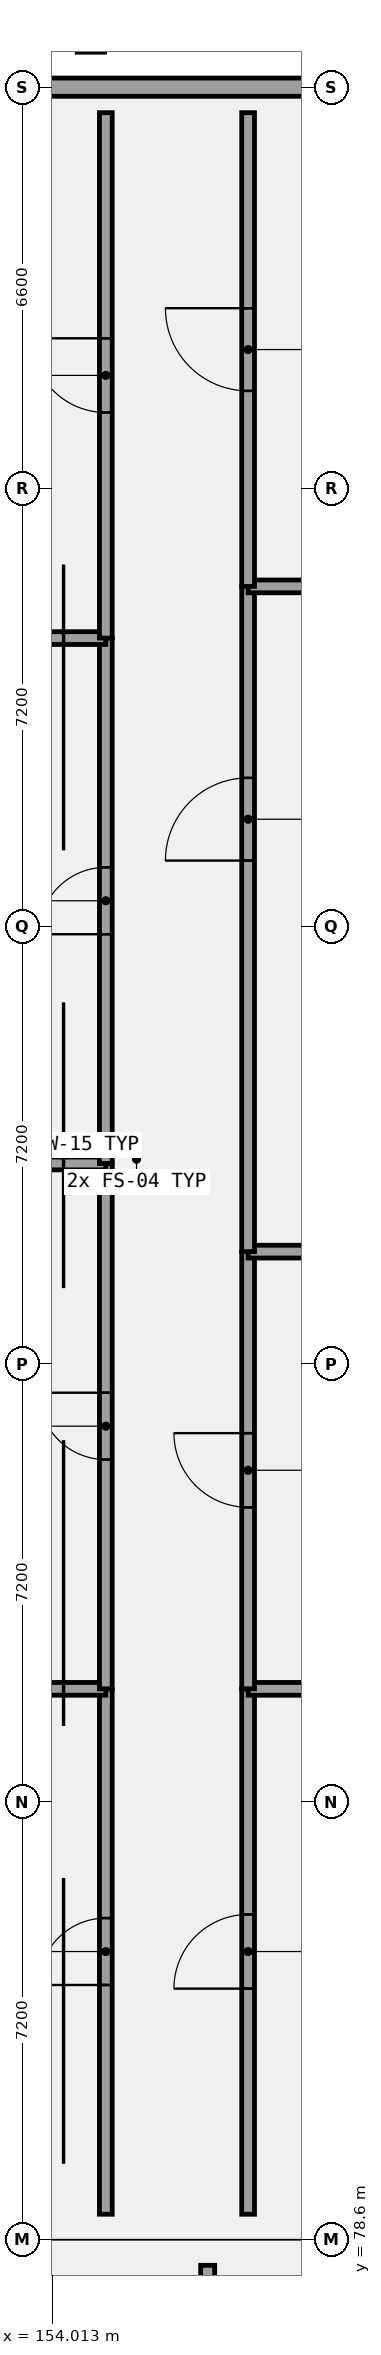
"""IFC4 building model, lengths in metres.
Left out: names, types, materials, properties, quantities, classifications, styles, units other than length and angle.
Written with IfcOpenShell. Run it as: python <this file> out.ifc"""

import sys

from ifc_helpers import new_model, si_unit, direction, frame, frame_2d, origin, origin_2d, place, context, subcontext, project, spatial, rectangle, extrude, element, fill, save


model = new_model("IFC4")
c1 = context("Model", 3, precision=1e-05, world=origin(), true_north=direction((0.0, 1.0)))
c2 = subcontext(c1, "Body", "Model", "MODEL_VIEW")
j1 = project(units=[si_unit("LENGTHUNIT", "METRE"), si_unit("PLANEANGLEUNIT", "RADIAN")], contexts=[c1])
p1 = place(None, origin())
s1 = spatial("IfcSite", under=j1, at=p1, CompositionType="ELEMENT")
p2 = place(p1, origin())
s2 = spatial("IfcBuilding", under=s1, at=p2, CompositionType="ELEMENT")
p3 = place(p2, frame((0.0, 0.0, 5.4)))
s3 = spatial("IfcBuildingStorey", under=s2, at=p3, CompositionType="ELEMENT", Elevation=5.4)
p4 = place(p3, frame((154.65, 114.95, 0.0), z_axis=(0.0, 0.0, 1.0), x_axis=(1.0, 0.0, 0.0)))
e1 = element("IfcColumn", 1, at=p4, inside=s3, PredefinedType="PILASTER", context=c2, shape_type="SweptSolid", body=[
    extrude(rectangle(XDim=0.45, YDim=0.75, at=origin_2d()), origin(), (0.0, 0.0, 1.0), 4.2),
])
p5 = place(p3, frame((166.35, 114.0, 0.0), z_axis=(0.0, 0.0, 1.0), x_axis=(-1.0, 0.0, 0.0)))
e2 = element("IfcWall", 2, at=p5, inside=s3, PredefinedType="SOLIDWALL", context=c2, shape_type="SweptSolid", body=[
    extrude(rectangle(XDim=21.9, YDim=0.3, at=frame_2d((10.95, 0.0))), origin(), (0.0, 0.0, 1.0), 3.17),
])
p6 = place(p5, frame((17.65, 0.0, 0.95)))
e3 = element("IfcOpeningElement", 3, at=p6, cuts=e2, PredefinedType="OPENING", context=c2, shape_type="SweptSolid", body=[
    extrude(rectangle(XDim=1.0, YDim=1.9, at=frame_2d((0.5, 0.95))), frame((0.0, 0.16, 0.0), z_axis=(0.0, -1.0, 0.0), x_axis=(1.0, 0.0, 0.0)), (0.0, 0.0, 1.0), 0.32),
])
p7 = place(p3, frame((154.895, 79.02, 0.0), z_axis=(0.0, 0.0, 1.0), x_axis=(0.0, 1.0, 0.0)))
e4 = element("IfcWall", 4, at=p7, inside=s3, PredefinedType="PARTITIONING", context=c2, shape_type="SweptSolid", body=[
    extrude(rectangle(XDim=8.64, YDim=0.21, at=frame_2d((4.32, 0.0))), origin(), (0.0, 0.0, 1.0), 3.92),
])
p8 = place(p7, frame((3.77, 0.0, 0.0)))
e5 = element("IfcOpeningElement", 5, at=p8, cuts=e4, PredefinedType="OPENING", context=c2, shape_type="SweptSolid", body=[
    extrude(rectangle(XDim=1.1, YDim=2.1, at=frame_2d((0.55, 1.05))), frame((0.0, 0.115, 0.0), z_axis=(0.0, -1.0, 0.0), x_axis=(1.0, 0.0, 0.0)), (0.0, 0.0, 1.0), 0.23),
])
p9 = place(p3, frame((145.25, 87.66, 0.0), z_axis=(0.0, 0.0, 1.0), x_axis=(1.0, 0.0, 0.0)))
e6 = element("IfcWall", 6, at=p9, inside=s3, PredefinedType="PARTITIONING", context=c2, shape_type="SweptSolid", body=[
    extrude(rectangle(XDim=9.645, YDim=0.21, at=frame_2d((4.823, 0.0))), origin(), (0.0, 0.0, 1.0), 3.37),
])
p10 = place(p3, frame((154.895, 87.66, 0.0), z_axis=(0.0, 0.0, 1.0), x_axis=(0.0, 1.0, 0.0)))
e7 = element("IfcWall", 7, at=p10, inside=s3, PredefinedType="PARTITIONING", context=c2, shape_type="SweptSolid", body=[
    extrude(rectangle(XDim=8.64, YDim=0.21, at=frame_2d((4.32, 0.0))), origin(), (0.0, 0.0, 1.0), 3.92),
])
p11 = place(p10, frame((3.77, 0.0, 0.0)))
e8 = element("IfcOpeningElement", 8, at=p11, cuts=e7, PredefinedType="OPENING", context=c2, shape_type="SweptSolid", body=[
    extrude(rectangle(XDim=1.1, YDim=2.22, at=frame_2d((0.55, 1.11))), frame((0.0, 0.115, 0.0), z_axis=(0.0, -1.0, 0.0), x_axis=(1.0, 0.0, 0.0)), (0.0, 0.0, 1.0), 0.23),
])
p12 = place(p3, frame((145.25, 96.3, 0.0), z_axis=(0.0, 0.0, 1.0), x_axis=(1.0, 0.0, 0.0)))
e9 = element("IfcWall", 9, at=p12, inside=s3, PredefinedType="PARTITIONING", context=c2, shape_type="SweptSolid", body=[
    extrude(rectangle(XDim=9.645, YDim=0.21, at=frame_2d((4.823, 0.0))), origin(), (0.0, 0.0, 1.0), 3.92),
])
p13 = place(p3, frame((154.895, 96.3, 0.0), z_axis=(0.0, 0.0, 1.0), x_axis=(0.0, 1.0, 0.0)))
e10 = element("IfcWall", 10, at=p13, inside=s3, PredefinedType="PARTITIONING", context=c2, shape_type="SweptSolid", body=[
    extrude(rectangle(XDim=8.64, YDim=0.21, at=frame_2d((4.32, 0.0))), origin(), (0.0, 0.0, 1.0), 3.92),
])
p14 = place(p13, frame((3.77, 0.0, 0.0)))
e11 = element("IfcOpeningElement", 11, at=p14, cuts=e10, PredefinedType="OPENING", context=c2, shape_type="SweptSolid", body=[
    extrude(rectangle(XDim=1.1, YDim=2.35, at=frame_2d((0.55, 1.175))), frame((0.0, 0.115, 0.0), z_axis=(0.0, -1.0, 0.0), x_axis=(1.0, 0.0, 0.0)), (0.0, 0.0, 1.0), 0.23),
])
p15 = place(p3, frame((145.25, 104.94, 0.0), z_axis=(0.0, 0.0, 1.0), x_axis=(1.0, 0.0, 0.0)))
e12 = element("IfcWall", 12, at=p15, inside=s3, PredefinedType="PARTITIONING", context=c2, shape_type="SweptSolid", body=[
    extrude(rectangle(XDim=9.645, YDim=0.21, at=frame_2d((4.823, 0.0))), origin(), (0.0, 0.0, 1.0), 3.92),
])
p16 = place(p3, frame((154.895, 104.94, 0.0), z_axis=(0.0, 0.0, 1.0), x_axis=(0.0, 1.0, 0.0)))
e13 = element("IfcWall", 13, at=p16, inside=s3, PredefinedType="PARTITIONING", context=c2, shape_type="SweptSolid", body=[
    extrude(rectangle(XDim=8.64, YDim=0.21, at=frame_2d((4.32, 0.0))), origin(), (0.0, 0.0, 1.0), 3.92),
])
p17 = place(p16, frame((3.71, 0.0, 0.0)))
e14 = element("IfcOpeningElement", 14, at=p17, cuts=e13, PredefinedType="OPENING", context=c2, shape_type="SweptSolid", body=[
    extrude(rectangle(XDim=1.22, YDim=2.1, at=frame_2d((0.61, 1.05))), frame((0.0, 0.115, 0.0), z_axis=(0.0, -1.0, 0.0), x_axis=(1.0, 0.0, 0.0)), (0.0, 0.0, 1.0), 0.23),
])
p18 = place(p3, frame((157.235, 79.02, 0.0), z_axis=(0.0, 0.0, 1.0), x_axis=(0.0, 1.0, 0.0)))
e15 = element("IfcWall", 15, at=p18, inside=s3, PredefinedType="PARTITIONING", context=c2, shape_type="SweptSolid", body=[
    extrude(rectangle(XDim=8.64, YDim=0.21, at=frame_2d((4.32, 0.0))), origin(), (0.0, 0.0, 1.0), 3.92),
])
p19 = place(p18, frame((3.71, 0.0, 0.0)))
e16 = element("IfcOpeningElement", 16, at=p19, cuts=e15, PredefinedType="OPENING", context=c2, shape_type="SweptSolid", body=[
    extrude(rectangle(XDim=1.22, YDim=2.22, at=frame_2d((0.61, 1.11))), frame((0.0, 0.115, 0.0), z_axis=(0.0, -1.0, 0.0), x_axis=(1.0, 0.0, 0.0)), (0.0, 0.0, 1.0), 0.23),
])
p20 = place(p3, frame((157.235, 87.66, 0.0), z_axis=(0.0, 0.0, 1.0), x_axis=(1.0, 0.0, 0.0)))
e17 = element("IfcWall", 17, at=p20, inside=s3, PredefinedType="PARTITIONING", context=c2, shape_type="SweptSolid", body=[
    extrude(rectangle(XDim=8.785, YDim=0.21, at=frame_2d((4.393, 0.0))), origin(), (0.0, 0.0, 1.0), 3.37),
])
p21 = place(p3, frame((157.235, 87.66, 0.0), z_axis=(0.0, 0.0, 1.0), x_axis=(0.0, 1.0, 0.0)))
e18 = element("IfcWall", 18, at=p21, inside=s3, PredefinedType="PARTITIONING", context=c2, shape_type="SweptSolid", body=[
    extrude(rectangle(XDim=7.19, YDim=0.21, at=frame_2d((3.595, 0.0))), origin(), (0.0, 0.0, 1.0), 3.92),
])
p22 = place(p21, frame((2.985, 0.0, 0.0)))
e19 = element("IfcOpeningElement", 19, at=p22, cuts=e18, PredefinedType="OPENING", context=c2, shape_type="SweptSolid", body=[
    extrude(rectangle(XDim=1.22, YDim=2.35, at=frame_2d((0.61, 1.175))), frame((0.0, 0.115, 0.0), z_axis=(0.0, -1.0, 0.0), x_axis=(1.0, 0.0, 0.0)), (0.0, 0.0, 1.0), 0.23),
])
p23 = place(p3, frame((157.235, 94.85, 0.0), z_axis=(0.0, 0.0, 1.0), x_axis=(1.0, 0.0, 0.0)))
e20 = element("IfcWall", 20, at=p23, inside=s3, PredefinedType="PARTITIONING", context=c2, shape_type="SweptSolid", body=[
    extrude(rectangle(XDim=8.785, YDim=0.21, at=frame_2d((4.393, 0.0))), origin(), (0.0, 0.0, 1.0), 3.37),
])
p24 = place(p3, frame((157.235, 94.85, 0.0), z_axis=(0.0, 0.0, 1.0), x_axis=(0.0, 1.0, 0.0)))
e21 = element("IfcWall", 21, at=p24, inside=s3, PredefinedType="PARTITIONING", context=c2, shape_type="SweptSolid", body=[
    extrude(rectangle(XDim=10.94, YDim=0.21, at=frame_2d((5.47, 0.0))), origin(), (0.0, 0.0, 1.0), 3.92),
])
p25 = place(p24, frame((6.431, 0.0, 0.0)))
e22 = element("IfcOpeningElement", 22, at=p25, cuts=e21, PredefinedType="OPENING", context=c2, shape_type="SweptSolid", body=[
    extrude(rectangle(XDim=1.36, YDim=2.1, at=frame_2d((0.68, 1.05))), frame((0.0, 0.115, 0.0), z_axis=(0.0, -1.0, 0.0), x_axis=(1.0, 0.0, 0.0)), (0.0, 0.0, 1.0), 0.23),
])
p26 = place(p3, frame((157.235, 105.79, 0.0), z_axis=(0.0, 0.0, 1.0), x_axis=(1.0, 0.0, 0.0)))
e23 = element("IfcWall", 23, at=p26, inside=s3, PredefinedType="PARTITIONING", context=c2, shape_type="SweptSolid", body=[
    extrude(rectangle(XDim=8.785, YDim=0.21, at=frame_2d((4.393, 0.0))), origin(), (0.0, 0.0, 1.0), 3.37),
])
p27 = place(p3, frame((157.235, 105.79, 0.0), z_axis=(0.0, 0.0, 1.0), x_axis=(0.0, 1.0, 0.0)))
e24 = element("IfcWall", 24, at=p27, inside=s3, PredefinedType="PARTITIONING", context=c2, shape_type="SweptSolid", body=[
    extrude(rectangle(XDim=7.79, YDim=0.21, at=frame_2d((3.895, 0.0))), origin(), (0.0, 0.0, 1.0), 3.92),
])
p28 = place(p27, frame((3.215, 0.0, 0.0)))
e25 = element("IfcOpeningElement", 25, at=p28, cuts=e24, PredefinedType="OPENING", context=c2, shape_type="SweptSolid", body=[
    extrude(rectangle(XDim=1.36, YDim=2.22, at=frame_2d((0.68, 1.11))), frame((0.0, 0.115, 0.0), z_axis=(0.0, -1.0, 0.0), x_axis=(1.0, 0.0, 0.0)), (0.0, 0.0, 1.0), 0.23),
])
p29 = place(p3, frame((156.57, 72.634, 0.0), z_axis=(0.0, 0.0, 1.0), x_axis=(0.0, 1.0, 0.0)))
e26 = element("IfcWall", 26, at=p29, inside=s3, PredefinedType="PARTITIONING", context=c2, shape_type="SweptSolid", body=[
    extrude(rectangle(XDim=5.546, YDim=0.23, at=frame_2d((2.773, 0.0))), origin(), (0.0, 0.0, 1.0), 3.92),
])
p30 = place(p29, frame((2.093, 0.0, 0.0)))
e27 = element("IfcOpeningElement", 27, at=p30, cuts=e26, PredefinedType="OPENING", context=c2, shape_type="SweptSolid", body=[
    extrude(rectangle(XDim=1.36, YDim=2.1, at=frame_2d((0.68, 1.05))), frame((0.0, 0.125, 0.0), z_axis=(0.0, -1.0, 0.0), x_axis=(1.0, 0.0, 0.0)), (0.0, 0.0, 1.0), 0.25),
])
p31 = place(p8, frame((1.1, 0.0, 0.0), z_axis=(0.0, 0.0, 1.0), x_axis=(-1.0, 0.0, 0.0)))
e28 = element("IfcDoor", 28, at=p31, inside=s3, OperationType="SINGLE_SWING_LEFT", PredefinedType="DOOR", context=c2, shape_type="SweptSolid", body=[
    extrude(rectangle(XDim=1.1, YDim=2.1, at=frame_2d((0.55, 1.05))), frame((0.0, 0.025, 0.0), z_axis=(0.0, -1.0, 0.0), x_axis=(1.0, 0.0, 0.0)), (0.0, 0.0, 1.0), 0.05),
])
fill(e5, e28)
p32 = place(p11, frame((1.1, 0.0, 0.0), z_axis=(0.0, 0.0, 1.0), x_axis=(-1.0, 0.0, 0.0)))
e29 = element("IfcDoor", 29, at=p32, inside=s3, OperationType="SINGLE_SWING_RIGHT", PredefinedType="DOOR", context=c2, shape_type="SweptSolid", body=[
    extrude(rectangle(XDim=1.1, YDim=2.22, at=frame_2d((0.55, 1.11))), frame((0.0, 0.025, 0.0), z_axis=(0.0, -1.0, 0.0), x_axis=(1.0, 0.0, 0.0)), (0.0, 0.0, 1.0), 0.05),
])
fill(e8, e29)
p33 = place(p14, frame((1.1, 0.0, 0.0), z_axis=(0.0, 0.0, 1.0), x_axis=(-1.0, 0.0, 0.0)))
e30 = element("IfcDoor", 30, at=p33, inside=s3, OperationType="SINGLE_SWING_LEFT", PredefinedType="DOOR", context=c2, shape_type="SweptSolid", body=[
    extrude(rectangle(XDim=1.1, YDim=2.35, at=frame_2d((0.55, 1.175))), frame((0.0, 0.025, 0.0), z_axis=(0.0, -1.0, 0.0), x_axis=(1.0, 0.0, 0.0)), (0.0, 0.0, 1.0), 0.05),
])
fill(e11, e30)
p34 = place(p17, frame((1.22, 0.0, 0.0), z_axis=(0.0, 0.0, 1.0), x_axis=(-1.0, 0.0, 0.0)))
e31 = element("IfcDoor", 31, at=p34, inside=s3, OperationType="SINGLE_SWING_RIGHT", PredefinedType="DOOR", context=c2, shape_type="SweptSolid", body=[
    extrude(rectangle(XDim=1.22, YDim=2.1, at=frame_2d((0.61, 1.05))), frame((0.0, 0.025, 0.0), z_axis=(0.0, -1.0, 0.0), x_axis=(1.0, 0.0, 0.0)), (0.0, 0.0, 1.0), 0.05),
])
fill(e14, e31)
p35 = place(p19, origin())
e32 = element("IfcDoor", 32, at=p35, inside=s3, OperationType="SINGLE_SWING_LEFT", PredefinedType="DOOR", context=c2, shape_type="SweptSolid", body=[
    extrude(rectangle(XDim=1.22, YDim=2.22, at=frame_2d((0.61, 1.11))), frame((0.0, 0.025, 0.0), z_axis=(0.0, -1.0, 0.0), x_axis=(1.0, 0.0, 0.0)), (0.0, 0.0, 1.0), 0.05),
])
fill(e16, e32)
p36 = place(p22, origin())
e33 = element("IfcDoor", 33, at=p36, inside=s3, OperationType="SINGLE_SWING_RIGHT", PredefinedType="DOOR", context=c2, shape_type="SweptSolid", body=[
    extrude(rectangle(XDim=1.22, YDim=2.35, at=frame_2d((0.61, 1.175))), frame((0.0, 0.025, 0.0), z_axis=(0.0, -1.0, 0.0), x_axis=(1.0, 0.0, 0.0)), (0.0, 0.0, 1.0), 0.05),
])
fill(e19, e33)
p37 = place(p25, origin())
e34 = element("IfcDoor", 34, at=p37, inside=s3, OperationType="SINGLE_SWING_LEFT", PredefinedType="DOOR", context=c2, shape_type="SweptSolid", body=[
    extrude(rectangle(XDim=1.36, YDim=2.1, at=frame_2d((0.68, 1.05))), frame((0.0, 0.025, 0.0), z_axis=(0.0, -1.0, 0.0), x_axis=(1.0, 0.0, 0.0)), (0.0, 0.0, 1.0), 0.05),
])
fill(e22, e34)
p38 = place(p28, origin())
e35 = element("IfcDoor", 35, at=p38, inside=s3, OperationType="SINGLE_SWING_RIGHT", PredefinedType="DOOR", context=c2, shape_type="SweptSolid", body=[
    extrude(rectangle(XDim=1.36, YDim=2.22, at=frame_2d((0.68, 1.11))), frame((0.0, 0.025, 0.0), z_axis=(0.0, -1.0, 0.0), x_axis=(1.0, 0.0, 0.0)), (0.0, 0.0, 1.0), 0.05),
])
fill(e25, e35)
save(model, sys.argv[1])
